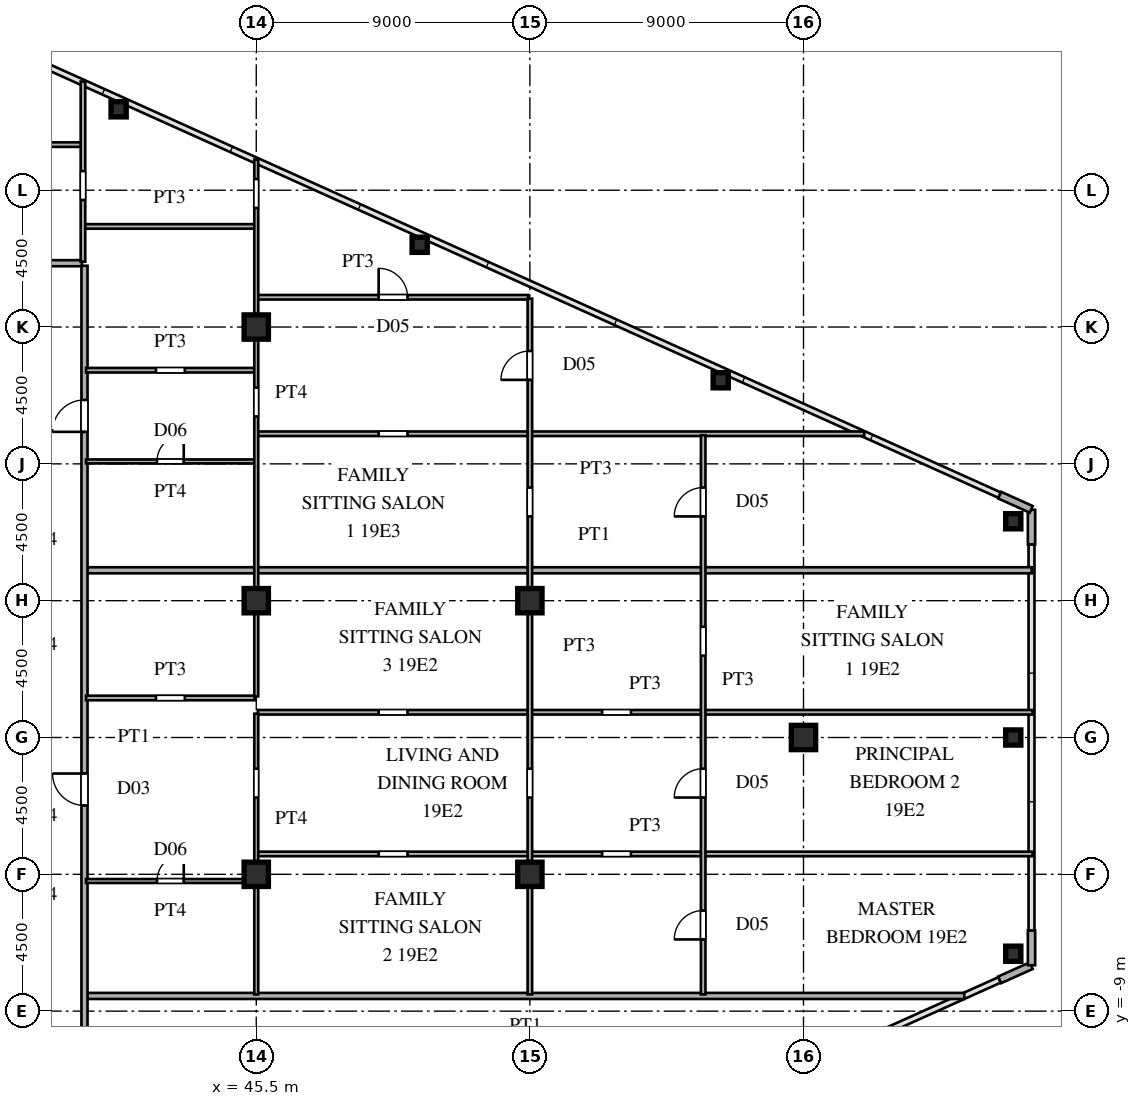
"""IFC4 building model, lengths in metres.
Left out: names, types, materials, properties, quantities, classifications, styles, units other than length and angle.
Written with IfcOpenShell. Run it as: python <this file> out.ifc"""

import sys

from ifc_helpers import new_model, si_unit, direction, frame, frame_2d, origin, origin_2d, place, context, subcontext, project, spatial, rectangle, hollow_rectangle, i_section, extrude, source, transform, mapped, element, fill, save


model = new_model("IFC4")
c1 = context("Model", 3, precision=1e-05, world=origin(), true_north=direction((0.0, 1.0)))
c2 = subcontext(c1, "Body", "Model", "MODEL_VIEW")
j1 = project(units=[si_unit("LENGTHUNIT", "METRE"), si_unit("PLANEANGLEUNIT", "RADIAN")], contexts=[c1])
p1 = place(None, origin())
s1 = spatial("IfcSite", under=j1, at=p1, CompositionType="ELEMENT")
p2 = place(p1, origin())
s2 = spatial("IfcBuilding", under=s1, at=p2, CompositionType="ELEMENT")
p3 = place(p2, frame((0.0, 0.0, 72.9)))
s3 = spatial("IfcBuildingStorey", under=s2, at=p3, CompositionType="ELEMENT", Elevation=72.9)
m1 = source(origin(), c2, "Body", "SweptSolid", [
    extrude(i_section(OverallWidth=0.8, OverallDepth=0.8, WebThickness=0.032, FlangeThickness=0.05, at=origin_2d()), origin(), (0.0, 0.0, 1.0), 3.6),
])
for number, where, z_axis, x_axis in (
    (1, (45.5, -4.5, 0.0), (0.0, 0.0, 1.0), (1.0, 0.0, 0.0)),
    (2, (45.5, 4.5, 0.0), (0.0, 0.0, 1.0), (1.0, 0.0, 0.0)),
    (3, (45.5, 13.5, 0.0), (0.0, 0.0, 1.0), (1.0, 0.0, 0.0)),
    (4, (54.5, -4.5, 0.0), (0.0, 0.0, 1.0), (1.0, 0.0, 0.0)),
    (5, (54.5, 4.5, 0.0), (0.0, 0.0, 1.0), (1.0, 0.0, 0.0)),
    (6, (63.5, 0.0, 0.0), (0.0, 0.0, 1.0), (1.0, 0.0, 0.0)),
):
    element("IfcColumn", number, at=place(p3, frame(where, z_axis=z_axis, x_axis=x_axis)), inside=s3, PredefinedType="COLUMN", context=c2, shape_type="MappedRepresentation", body=[
        mapped(m1, transform((0.0, 0.0, 0.0), scale=1.0)),
    ])
m2 = source(origin(), c2, "Body", "SweptSolid", [
    extrude(hollow_rectangle(XDim=0.5, YDim=0.5, WallThickness=0.02, at=origin_2d()), origin(), (0.0, 0.0, 1.0), 3.6),
])
for number, where, z_axis, x_axis in (
    (7, (70.4, -7.112, 0.0), (0.0, 0.0, 1.0), (1.0, 0.0, 0.0)),
    (8, (70.4, 7.112, 0.0), (0.0, 0.0, 1.0), (1.0, 0.0, 0.0)),
    (9, (40.973, 20.661, 0.0), (0.0, 0.0, 1.0), (1.0, 0.0, 0.0)),
    (10, (50.875, 16.205, 0.0), (0.0, 0.0, 1.0), (1.0, 0.0, 0.0)),
    (11, (60.778, 11.749, 0.0), (0.0, 0.0, 1.0), (1.0, 0.0, 0.0)),
    (12, (70.4, 0.0, 0.0), (0.0, 0.0, 1.0), (1.0, 0.0, 0.0)),
):
    element("IfcColumn", number, at=place(p3, frame(where, z_axis=z_axis, x_axis=x_axis)), inside=s3, PredefinedType="COLUMN", context=c2, shape_type="MappedRepresentation", body=[
        mapped(m2, transform((0.0, 0.0, 0.0), scale=1.0)),
    ])
for number, where, z_axis, x_axis in (
    (13, (69.951, -7.972, 0.0), (0.0, 0.0, 1.0), (0.912, 0.41, 0.0)),
    (14, (71.0, -7.49, 0.0), (0.0, 0.0, 1.0), (0.0, 1.0, 0.0)),
    (15, (71.0, 6.35, 0.0), (0.0, 0.0, 1.0), (0.0, 1.0, 0.0)),
    (16, (70.991, 7.504, 0.0), (0.0, 0.0, 1.0), (-0.912, 0.41, 0.0)),
):
    element("IfcWall", number, at=place(p3, frame(where, z_axis=z_axis, x_axis=x_axis)), inside=s3, PredefinedType="SOLIDWALL", context=c2, shape_type="SweptSolid", body=[
        extrude(rectangle(XDim=1.14, YDim=0.24, at=frame_2d((0.57, 0.0))), origin(), (0.0, 0.0, 1.0), 3.38),
    ])
p4 = place(p3, frame((39.93, -8.5, 0.0), z_axis=(0.0, 0.0, 1.0), x_axis=(1.0, 0.0, 0.0)))
e17 = element("IfcWall", 17, at=p4, inside=s3, PredefinedType="PARTITIONING", context=c2, shape_type="SweptSolid", body=[
    extrude(rectangle(XDim=28.86, YDim=0.2, at=frame_2d((14.43, 0.0))), origin(), (0.0, 0.0, 1.0), 3.38),
])
p5 = place(p3, frame((39.9, -4.72, 0.0), z_axis=(0.0, 0.0, 1.0), x_axis=(1.0, 0.0, 0.0)))
e18 = element("IfcWall", 18, at=p5, inside=s3, PredefinedType="PARTITIONING", context=c2, shape_type="SweptSolid", body=[
    extrude(rectangle(XDim=5.55, YDim=0.13, at=frame_2d((2.775, 0.0))), origin(), (0.0, 0.0, 1.0), 3.38),
])
p6 = place(p5, frame((2.335, 0.0, 0.0)))
e19 = element("IfcOpeningElement", 19, at=p6, cuts=e18, PredefinedType="OPENING", context=c2, shape_type="SweptSolid", body=[
    extrude(rectangle(XDim=0.88, YDim=2.1, at=frame_2d((0.44, 1.05))), frame((0.0, 0.075, 0.0), z_axis=(0.0, -1.0, 0.0), x_axis=(1.0, 0.0, 0.0)), (0.0, 0.0, 1.0), 0.15),
])
p7 = place(p3, frame((45.55, -3.83, 0.0), z_axis=(0.0, 0.0, 1.0), x_axis=(1.0, 0.0, 0.0)))
e20 = element("IfcWall", 20, at=p7, inside=s3, PredefinedType="PARTITIONING", context=c2, shape_type="SweptSolid", body=[
    extrude(rectangle(XDim=25.485, YDim=0.15, at=frame_2d((12.742, 0.0))), origin(), (0.0, 0.0, 1.0), 3.38),
])
p8 = place(p7, frame((3.975, 0.0, 0.0)))
e21 = element("IfcOpeningElement", 21, at=p8, cuts=e20, PredefinedType="OPENING", context=c2, shape_type="SweptSolid", body=[
    extrude(rectangle(XDim=0.95, YDim=2.15, at=frame_2d((0.475, 1.075))), frame((0.0, 0.085, 0.0), z_axis=(0.0, -1.0, 0.0), x_axis=(1.0, 0.0, 0.0)), (0.0, 0.0, 1.0), 0.17),
])
p9 = place(p7, frame((11.325, 0.0, 0.0)))
e22 = element("IfcOpeningElement", 22, at=p9, cuts=e20, PredefinedType="OPENING", context=c2, shape_type="SweptSolid", body=[
    extrude(rectangle(XDim=0.95, YDim=2.15, at=frame_2d((0.475, 1.075))), frame((0.0, 0.085, 0.0), z_axis=(0.0, -1.0, 0.0), x_axis=(1.0, 0.0, 0.0)), (0.0, 0.0, 1.0), 0.17),
])
p10 = place(p3, frame((45.55, 0.83, 0.0), z_axis=(0.0, 0.0, 1.0), x_axis=(1.0, 0.0, 0.0)))
e23 = element("IfcWall", 23, at=p10, inside=s3, PredefinedType="PARTITIONING", context=c2, shape_type="SweptSolid", body=[
    extrude(rectangle(XDim=25.485, YDim=0.15, at=frame_2d((12.742, 0.0))), origin(), (0.0, 0.0, 1.0), 3.38),
])
p11 = place(p10, frame((3.975, 0.0, 0.0)))
e24 = element("IfcOpeningElement", 24, at=p11, cuts=e23, PredefinedType="OPENING", context=c2, shape_type="SweptSolid", body=[
    extrude(rectangle(XDim=0.95, YDim=2.15, at=frame_2d((0.475, 1.075))), frame((0.0, 0.085, 0.0), z_axis=(0.0, -1.0, 0.0), x_axis=(1.0, 0.0, 0.0)), (0.0, 0.0, 1.0), 0.17),
])
p12 = place(p10, frame((11.325, 0.0, 0.0)))
e25 = element("IfcOpeningElement", 25, at=p12, cuts=e23, PredefinedType="OPENING", context=c2, shape_type="SweptSolid", body=[
    extrude(rectangle(XDim=0.95, YDim=2.15, at=frame_2d((0.475, 1.075))), frame((0.0, 0.085, 0.0), z_axis=(0.0, -1.0, 0.0), x_axis=(1.0, 0.0, 0.0)), (0.0, 0.0, 1.0), 0.17),
])
p13 = place(p3, frame((39.9, 1.3, 0.0), z_axis=(0.0, 0.0, 1.0), x_axis=(1.0, 0.0, 0.0)))
e26 = element("IfcWall", 26, at=p13, inside=s3, PredefinedType="PARTITIONING", context=c2, shape_type="SweptSolid", body=[
    extrude(rectangle(XDim=5.55, YDim=0.15, at=frame_2d((2.775, 0.0))), origin(), (0.0, 0.0, 1.0), 3.38),
])
p14 = place(p13, frame((2.3, 0.0, 0.0)))
e27 = element("IfcOpeningElement", 27, at=p14, cuts=e26, PredefinedType="OPENING", context=c2, shape_type="SweptSolid", body=[
    extrude(rectangle(XDim=0.95, YDim=2.15, at=frame_2d((0.475, 1.075))), frame((0.0, 0.085, 0.0), z_axis=(0.0, -1.0, 0.0), x_axis=(1.0, 0.0, 0.0)), (0.0, 0.0, 1.0), 0.17),
])
p15 = place(p3, frame((39.93, 5.5, 0.0), z_axis=(0.0, 0.0, 1.0), x_axis=(1.0, 0.0, 0.0)))
e28 = element("IfcWall", 28, at=p15, inside=s3, PredefinedType="PARTITIONING", context=c2, shape_type="SweptSolid", body=[
    extrude(rectangle(XDim=31.075, YDim=0.2, at=frame_2d((15.538, 0.0))), origin(), (0.0, 0.0, 1.0), 3.38),
])
p16 = place(p3, frame((39.9, 9.08, 0.0), z_axis=(0.0, 0.0, 1.0), x_axis=(1.0, 0.0, 0.0)))
e29 = element("IfcWall", 29, at=p16, inside=s3, PredefinedType="PARTITIONING", context=c2, shape_type="SweptSolid", body=[
    extrude(rectangle(XDim=5.55, YDim=0.13, at=frame_2d((2.775, 0.0))), origin(), (0.0, 0.0, 1.0), 3.38),
])
p17 = place(p16, frame((2.335, 0.0, 0.0)))
e30 = element("IfcOpeningElement", 30, at=p17, cuts=e29, PredefinedType="OPENING", context=c2, shape_type="SweptSolid", body=[
    extrude(rectangle(XDim=0.88, YDim=2.1, at=frame_2d((0.44, 1.05))), frame((0.0, 0.075, 0.0), z_axis=(0.0, -1.0, 0.0), x_axis=(1.0, 0.0, 0.0)), (0.0, 0.0, 1.0), 0.15),
])
p18 = place(p3, frame((45.55, 9.99, 0.0), z_axis=(0.0, 0.0, 1.0), x_axis=(1.0, 0.0, 0.0)))
e31 = element("IfcWall", 31, at=p18, inside=s3, PredefinedType="PARTITIONING", context=c2, shape_type="SweptSolid", body=[
    extrude(rectangle(XDim=19.948, YDim=0.15, at=frame_2d((9.974, 0.0))), origin(), (0.0, 0.0, 1.0), 3.38),
])
p19 = place(p18, frame((3.975, 0.0, 0.0)))
e32 = element("IfcOpeningElement", 32, at=p19, cuts=e31, PredefinedType="OPENING", context=c2, shape_type="SweptSolid", body=[
    extrude(rectangle(XDim=0.95, YDim=2.15, at=frame_2d((0.475, 1.075))), frame((0.0, 0.085, 0.0), z_axis=(0.0, -1.0, 0.0), x_axis=(1.0, 0.0, 0.0)), (0.0, 0.0, 1.0), 0.17),
])
p20 = place(p3, frame((39.9, 12.08, 0.0), z_axis=(0.0, 0.0, 1.0), x_axis=(1.0, 0.0, 0.0)))
e33 = element("IfcWall", 33, at=p20, inside=s3, PredefinedType="PARTITIONING", context=c2, shape_type="SweptSolid", body=[
    extrude(rectangle(XDim=5.55, YDim=0.15, at=frame_2d((2.775, 0.0))), origin(), (0.0, 0.0, 1.0), 3.38),
])
p21 = place(p20, frame((2.3, 0.0, 0.0)))
e34 = element("IfcOpeningElement", 34, at=p21, cuts=e33, PredefinedType="OPENING", context=c2, shape_type="SweptSolid", body=[
    extrude(rectangle(XDim=0.95, YDim=2.15, at=frame_2d((0.475, 1.075))), frame((0.0, 0.085, 0.0), z_axis=(0.0, -1.0, 0.0), x_axis=(1.0, 0.0, 0.0)), (0.0, 0.0, 1.0), 0.17),
])
p22 = place(p3, frame((45.55, 14.48, 0.0), z_axis=(0.0, 0.0, 1.0), x_axis=(1.0, 0.0, 0.0)))
e35 = element("IfcWall", 35, at=p22, inside=s3, PredefinedType="PARTITIONING", context=c2, shape_type="SweptSolid", body=[
    extrude(rectangle(XDim=8.9, YDim=0.15, at=frame_2d((4.45, 0.0))), origin(), (0.0, 0.0, 1.0), 3.38),
])
p23 = place(p22, frame((3.975, 0.0, 0.0)))
e36 = element("IfcOpeningElement", 36, at=p23, cuts=e35, PredefinedType="OPENING", context=c2, shape_type="SweptSolid", body=[
    extrude(rectangle(XDim=0.95, YDim=2.15, at=frame_2d((0.475, 1.075))), frame((0.0, 0.085, 0.0), z_axis=(0.0, -1.0, 0.0), x_axis=(1.0, 0.0, 0.0)), (0.0, 0.0, 1.0), 0.17),
])
p24 = place(p3, frame((36.585, 15.6, 0.0), z_axis=(0.0, 0.0, 1.0), x_axis=(1.0, 0.0, 0.0)))
e37 = element("IfcWall", 37, at=p24, inside=s3, PredefinedType="PARTITIONING", context=c2, shape_type="SweptSolid", body=[
    extrude(rectangle(XDim=3.18, YDim=0.2, at=frame_2d((1.59, 0.0))), origin(), (0.0, 0.0, 1.0), 3.38),
])
p25 = place(p3, frame((39.85, 16.81, 0.0), z_axis=(0.0, 0.0, 1.0), x_axis=(1.0, 0.0, 0.0)))
e38 = element("IfcWall", 38, at=p25, inside=s3, PredefinedType="PARTITIONING", context=c2, shape_type="SweptSolid", body=[
    extrude(rectangle(XDim=5.6, YDim=0.15, at=frame_2d((2.8, 0.0))), origin(), (0.0, 0.0, 1.0), 3.38),
])
p26 = place(p3, frame((27.465, 19.5, 0.0), z_axis=(0.0, 0.0, 1.0), x_axis=(1.0, 0.0, 0.0)))
e39 = element("IfcWall", 39, at=p26, inside=s3, PredefinedType="PARTITIONING", context=c2, shape_type="SweptSolid", body=[
    extrude(rectangle(XDim=12.285, YDim=0.15, at=frame_2d((6.143, 0.0))), origin(), (0.0, 0.0, 1.0), 3.38),
])
p27 = place(p26, frame((5.71, 0.0, 0.0)))
e40 = element("IfcOpeningElement", 40, at=p27, cuts=e39, PredefinedType="OPENING", context=c2, shape_type="SweptSolid", body=[
    extrude(rectangle(XDim=0.95, YDim=2.15, at=frame_2d((0.475, 1.075))), frame((0.0, 0.085, 0.0), z_axis=(0.0, -1.0, 0.0), x_axis=(1.0, 0.0, 0.0)), (0.0, 0.0, 1.0), 0.17),
])
p28 = place(p3, frame((39.8, 15.65, 0.0), z_axis=(0.0, 0.0, 1.0), x_axis=(0.0, 1.0, 0.0)))
e41 = element("IfcWall", 41, at=p28, inside=s3, PredefinedType="PARTITIONING", context=c2, shape_type="SweptSolid", body=[
    extrude(rectangle(XDim=5.925, YDim=0.15, at=frame_2d((2.962, 0.0))), origin(), (0.0, 0.0, 1.0), 3.38),
])
p29 = place(p28, frame((2.029, 0.0, 0.0)))
e42 = element("IfcOpeningElement", 42, at=p29, cuts=e41, PredefinedType="OPENING", context=c2, shape_type="SweptSolid", body=[
    extrude(rectangle(XDim=0.95, YDim=2.15, at=frame_2d((0.475, 1.075))), frame((0.0, 0.085, 0.0), z_axis=(0.0, -1.0, 0.0), x_axis=(1.0, 0.0, 0.0)), (0.0, 0.0, 1.0), 0.17),
])
p30 = place(p3, frame((39.85, -15.515, 0.0), z_axis=(0.0, 0.0, 1.0), x_axis=(0.0, 1.0, 0.0)))
e43 = element("IfcWall", 43, at=p30, inside=s3, PredefinedType="PARTITIONING", context=c2, shape_type="SweptSolid", body=[
    extrude(rectangle(XDim=31.03, YDim=0.2, at=frame_2d((15.515, 0.0))), origin(), (0.0, 0.0, 1.0), 3.38),
])
p31 = place(p30, frame((2.94, 0.0, 0.0)))
e44 = element("IfcOpeningElement", 44, at=p31, cuts=e43, PredefinedType="OPENING", context=c2, shape_type="SweptSolid", body=[
    extrude(rectangle(XDim=1.05, YDim=2.25, at=frame_2d((0.525, 1.125))), frame((0.0, 0.11, 0.0), z_axis=(0.0, -1.0, 0.0), x_axis=(1.0, 0.0, 0.0)), (0.0, 0.0, 1.0), 0.22),
])
p32 = place(p30, frame((13.28, 0.0, 0.0)))
e45 = element("IfcOpeningElement", 45, at=p32, cuts=e43, PredefinedType="OPENING", context=c2, shape_type="SweptSolid", body=[
    extrude(rectangle(XDim=1.05, YDim=2.25, at=frame_2d((0.525, 1.125))), frame((0.0, 0.11, 0.0), z_axis=(0.0, -1.0, 0.0), x_axis=(1.0, 0.0, 0.0)), (0.0, 0.0, 1.0), 0.22),
])
p33 = place(p30, frame((25.567, 0.0, 0.0)))
e46 = element("IfcOpeningElement", 46, at=p33, cuts=e43, PredefinedType="OPENING", context=c2, shape_type="SweptSolid", body=[
    extrude(rectangle(XDim=1.05, YDim=2.25, at=frame_2d((0.525, 1.125))), frame((0.0, 0.11, 0.0), z_axis=(0.0, -1.0, 0.0), x_axis=(1.0, 0.0, 0.0)), (0.0, 0.0, 1.0), 0.22),
])
p34 = place(p3, frame((45.5, -8.45, 0.0), z_axis=(0.0, 0.0, 1.0), x_axis=(0.0, 1.0, 0.0)))
e47 = element("IfcWall", 47, at=p34, inside=s3, PredefinedType="PARTITIONING", context=c2, shape_type="SweptSolid", body=[
    extrude(rectangle(XDim=9.233, YDim=0.13, at=frame_2d((4.616, 0.0))), origin(), (0.0, 0.0, 1.0), 2.68),
])
p35 = place(p34, frame((6.475, 0.0, 0.0)))
e48 = element("IfcOpeningElement", 48, at=p35, cuts=e47, PredefinedType="OPENING", context=c2, shape_type="SweptSolid", body=[
    extrude(rectangle(XDim=0.95, YDim=2.15, at=frame_2d((0.475, 1.075))), frame((0.0, 0.075, 0.0), z_axis=(0.0, -1.0, 0.0), x_axis=(1.0, 0.0, 0.0)), (0.0, 0.0, 1.0), 0.15),
])
p36 = place(p3, frame((45.5, 1.352, 0.0), z_axis=(0.0, 0.0, 1.0), x_axis=(0.0, 1.0, 0.0)))
e49 = element("IfcWall", 49, at=p36, inside=s3, PredefinedType="PARTITIONING", context=c2, shape_type="SweptSolid", body=[
    extrude(rectangle(XDim=17.658, YDim=0.13, at=frame_2d((8.829, 0.0))), origin(), (0.0, 0.0, 1.0), 2.68),
])
p37 = place(p36, frame((9.208, 0.0, 0.0)))
e50 = element("IfcOpeningElement", 50, at=p37, cuts=e49, PredefinedType="OPENING", context=c2, shape_type="SweptSolid", body=[
    extrude(rectangle(XDim=0.95, YDim=2.15, at=frame_2d((0.475, 1.075))), frame((0.0, 0.075, 0.0), z_axis=(0.0, -1.0, 0.0), x_axis=(1.0, 0.0, 0.0)), (0.0, 0.0, 1.0), 0.15),
])
p38 = place(p36, frame((16.065, 0.0, 0.0)))
e51 = element("IfcOpeningElement", 51, at=p38, cuts=e49, PredefinedType="OPENING", context=c2, shape_type="SweptSolid", body=[
    extrude(rectangle(XDim=0.95, YDim=2.15, at=frame_2d((0.475, 1.075))), frame((0.0, 0.075, 0.0), z_axis=(0.0, -1.0, 0.0), x_axis=(1.0, 0.0, 0.0)), (0.0, 0.0, 1.0), 0.15),
])
p39 = place(p3, frame((54.5, -8.45, 0.0), z_axis=(0.0, 0.0, 1.0), x_axis=(0.0, 1.0, 0.0)))
e52 = element("IfcWall", 52, at=p39, inside=s3, PredefinedType="PARTITIONING", context=c2, shape_type="SweptSolid", body=[
    extrude(rectangle(XDim=22.883, YDim=0.15, at=frame_2d((11.441, 0.0))), origin(), (0.0, 0.0, 1.0), 2.68),
])
p40 = place(p39, frame((6.475, 0.0, 0.0)))
e53 = element("IfcOpeningElement", 53, at=p40, cuts=e52, PredefinedType="OPENING", context=c2, shape_type="SweptSolid", body=[
    extrude(rectangle(XDim=0.95, YDim=2.15, at=frame_2d((0.475, 1.075))), frame((0.0, 0.085, 0.0), z_axis=(0.0, -1.0, 0.0), x_axis=(1.0, 0.0, 0.0)), (0.0, 0.0, 1.0), 0.17),
])
p41 = place(p39, frame((20.212, 0.0, 0.0)))
e54 = element("IfcOpeningElement", 54, at=p41, cuts=e52, PredefinedType="OPENING", context=c2, shape_type="SweptSolid", body=[
    extrude(rectangle(XDim=0.95, YDim=2.15, at=frame_2d((0.475, 1.075))), frame((0.0, 0.085, 0.0), z_axis=(0.0, -1.0, 0.0), x_axis=(1.0, 0.0, 0.0)), (0.0, 0.0, 1.0), 0.17),
])
p42 = place(p39, frame((15.721, 0.0, 0.0)))
e55 = element("IfcOpeningElement", 55, at=p42, cuts=e52, PredefinedType="OPENING", context=c2, shape_type="SweptSolid", body=[
    extrude(rectangle(XDim=0.95, YDim=2.15, at=frame_2d((0.475, 1.075))), frame((0.0, 0.085, 0.0), z_axis=(0.0, -1.0, 0.0), x_axis=(1.0, 0.0, 0.0)), (0.0, 0.0, 1.0), 0.17),
])
p43 = place(p3, frame((60.2, -8.45, 0.0), z_axis=(0.0, 0.0, 1.0), x_axis=(0.0, 1.0, 0.0)))
e56 = element("IfcWall", 56, at=p43, inside=s3, PredefinedType="PARTITIONING", context=c2, shape_type="SweptSolid", body=[
    extrude(rectangle(XDim=18.392, YDim=0.15, at=frame_2d((9.196, 0.0))), origin(), (0.0, 0.0, 1.0), 3.38),
])
p44 = place(p43, frame((1.808, 0.0, 0.0)))
e57 = element("IfcOpeningElement", 57, at=p44, cuts=e56, PredefinedType="OPENING", context=c2, shape_type="SweptSolid", body=[
    extrude(rectangle(XDim=0.95, YDim=2.15, at=frame_2d((0.475, 1.075))), frame((0.0, 0.085, 0.0), z_axis=(0.0, -1.0, 0.0), x_axis=(1.0, 0.0, 0.0)), (0.0, 0.0, 1.0), 0.17),
])
p45 = place(p43, frame((6.475, 0.0, 0.0)))
e58 = element("IfcOpeningElement", 58, at=p45, cuts=e56, PredefinedType="OPENING", context=c2, shape_type="SweptSolid", body=[
    extrude(rectangle(XDim=0.95, YDim=2.15, at=frame_2d((0.475, 1.075))), frame((0.0, 0.085, 0.0), z_axis=(0.0, -1.0, 0.0), x_axis=(1.0, 0.0, 0.0)), (0.0, 0.0, 1.0), 0.17),
])
p46 = place(p43, frame((11.142, 0.0, 0.0)))
e59 = element("IfcOpeningElement", 59, at=p46, cuts=e56, PredefinedType="OPENING", context=c2, shape_type="SweptSolid", body=[
    extrude(rectangle(XDim=0.95, YDim=2.15, at=frame_2d((0.475, 1.075))), frame((0.0, 0.085, 0.0), z_axis=(0.0, -1.0, 0.0), x_axis=(1.0, 0.0, 0.0)), (0.0, 0.0, 1.0), 0.17),
])
p47 = place(p43, frame((15.721, 0.0, 0.0)))
e60 = element("IfcOpeningElement", 60, at=p47, cuts=e56, PredefinedType="OPENING", context=c2, shape_type="SweptSolid", body=[
    extrude(rectangle(XDim=0.95, YDim=2.15, at=frame_2d((0.475, 1.075))), frame((0.0, 0.085, 0.0), z_axis=(0.0, -1.0, 0.0), x_axis=(1.0, 0.0, 0.0)), (0.0, 0.0, 1.0), 0.17),
])
m3 = source(origin(), c2, "Body", "SweptSolid", [
    extrude(rectangle(XDim=0.88, YDim=2.1, at=frame_2d((0.44, 1.05))), frame((0.0, 0.025, 0.0), z_axis=(0.0, -1.0, 0.0), x_axis=(1.0, 0.0, 0.0)), (0.0, 0.0, 1.0), 0.05),
])
p48 = place(p6, origin())
e61 = element("IfcDoor", 61, at=p48, inside=s3, OperationType="SINGLE_SWING_RIGHT", PredefinedType="DOOR", context=c2, shape_type="MappedRepresentation", body=[
    mapped(m3, transform((0.0, 0.0, 0.0), scale=1.0)),
])
fill(e19, e61)
p49 = place(p17, origin())
e62 = element("IfcDoor", 62, at=p49, inside=s3, OperationType="SINGLE_SWING_RIGHT", PredefinedType="DOOR", context=c2, shape_type="MappedRepresentation", body=[
    mapped(m3, transform((0.0, 0.0, 0.0), scale=1.0)),
])
fill(e30, e62)
m4 = source(origin(), c2, "Body", "SweptSolid", [
    extrude(rectangle(XDim=0.95, YDim=2.15, at=frame_2d((0.475, 1.075))), frame((0.0, 0.025, 0.0), z_axis=(0.0, -1.0, 0.0), x_axis=(1.0, 0.0, 0.0)), (0.0, 0.0, 1.0), 0.05),
])
p50 = place(p23, origin())
e63 = element("IfcDoor", 63, at=p50, inside=s3, OperationType="SINGLE_SWING_LEFT", PredefinedType="DOOR", context=c2, shape_type="MappedRepresentation", body=[
    mapped(m4, transform((0.0, 0.0, 0.0), scale=1.0)),
])
fill(e36, e63)
m5 = source(origin(), c2, "Body", "SweptSolid", [
    extrude(rectangle(XDim=1.05, YDim=2.25, at=frame_2d((0.525, 1.125))), frame((0.0, 0.025, 0.0), z_axis=(0.0, -1.0, 0.0), x_axis=(1.0, 0.0, 0.0)), (0.0, 0.0, 1.0), 0.05),
])
p51 = place(p32, origin())
e64 = element("IfcDoor", 64, at=p51, inside=s3, OperationType="SINGLE_SWING_RIGHT", PredefinedType="DOOR", context=c2, shape_type="MappedRepresentation", body=[
    mapped(m5, transform((0.0, 0.0, 0.0), scale=1.0)),
])
fill(e45, e64)
p52 = place(p33, origin())
e65 = element("IfcDoor", 65, at=p52, inside=s3, OperationType="SINGLE_SWING_LEFT", PredefinedType="DOOR", context=c2, shape_type="MappedRepresentation", body=[
    mapped(m5, transform((0.0, 0.0, 0.0), scale=1.0)),
])
fill(e46, e65)
p53 = place(p41, origin())
e66 = element("IfcDoor", 66, at=p53, inside=s3, OperationType="SINGLE_SWING_LEFT", PredefinedType="DOOR", context=c2, shape_type="MappedRepresentation", body=[
    mapped(m4, transform((0.0, 0.0, 0.0), scale=1.0)),
])
fill(e54, e66)
p54 = place(p44, origin())
e67 = element("IfcDoor", 67, at=p54, inside=s3, OperationType="SINGLE_SWING_LEFT", PredefinedType="DOOR", context=c2, shape_type="MappedRepresentation", body=[
    mapped(m4, transform((0.0, 0.0, 0.0), scale=1.0)),
])
fill(e57, e67)
p55 = place(p45, origin())
e68 = element("IfcDoor", 68, at=p55, inside=s3, OperationType="SINGLE_SWING_LEFT", PredefinedType="DOOR", context=c2, shape_type="MappedRepresentation", body=[
    mapped(m4, transform((0.0, 0.0, 0.0), scale=1.0)),
])
fill(e58, e68)
p56 = place(p47, origin())
e69 = element("IfcDoor", 69, at=p56, inside=s3, OperationType="SINGLE_SWING_LEFT", PredefinedType="DOOR", context=c2, shape_type="MappedRepresentation", body=[
    mapped(m4, transform((0.0, 0.0, 0.0), scale=1.0)),
])
fill(e60, e69)
save(model, sys.argv[1])
